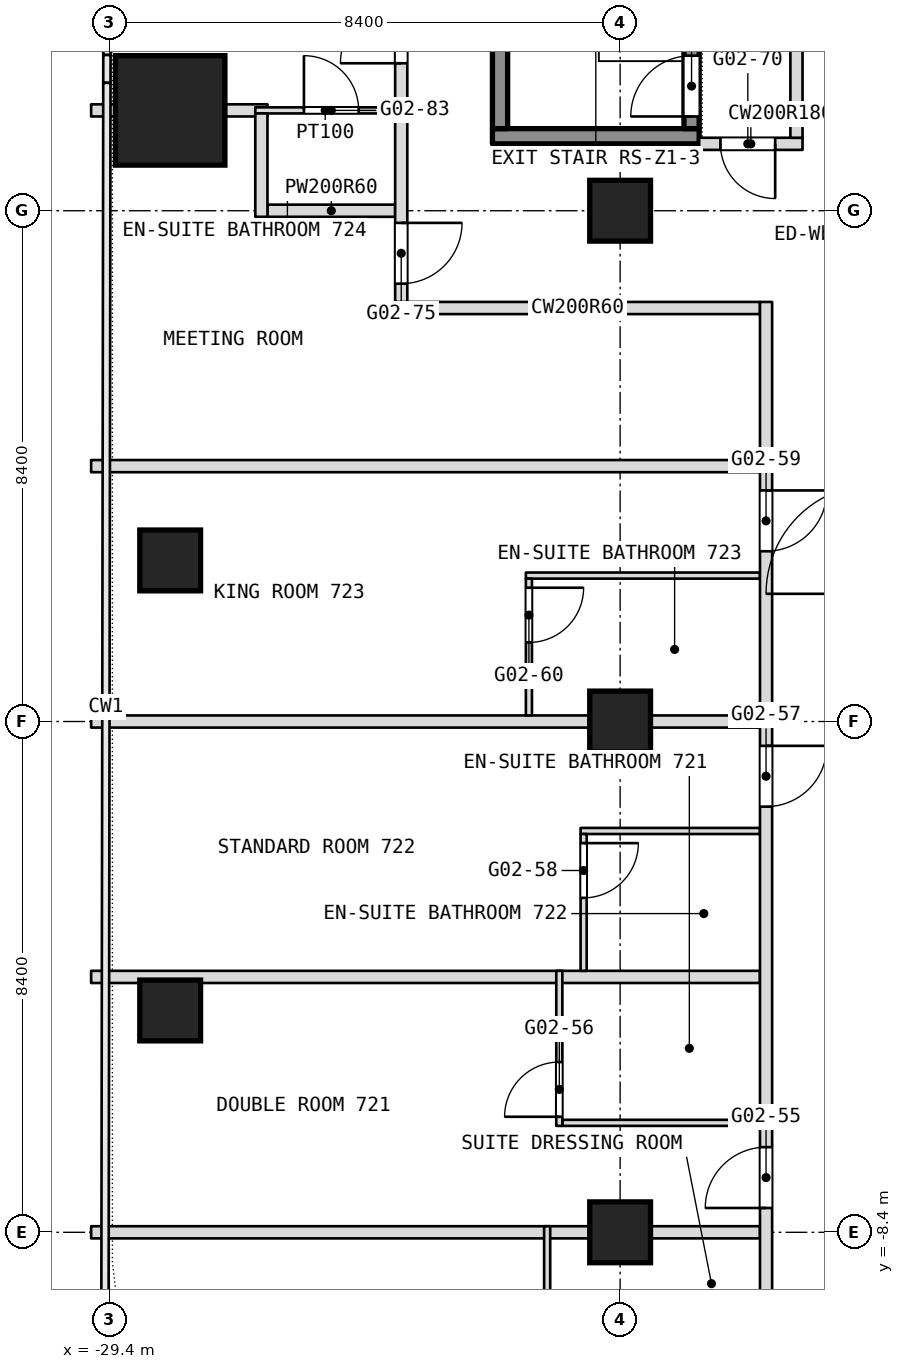
"""IFC4 building model, lengths in metres.
Left out: names, types, materials, properties, quantities, classifications, styles, units other than length and angle.
Written with IfcOpenShell. Run it as: python <this file> out.ifc"""

import sys

from ifc_helpers import new_model, si_unit, direction, frame, frame_2d, origin, origin_2d, place, context, subcontext, project, spatial, rectangle, extrude, element, fill, save


model = new_model("IFC4")
c1 = context("Model", 3, precision=1e-05, world=origin(), true_north=direction((0.0, 1.0)))
c2 = subcontext(c1, "Body", "Model", "MODEL_VIEW")
j1 = project(units=[si_unit("LENGTHUNIT", "METRE"), si_unit("PLANEANGLEUNIT", "RADIAN")], contexts=[c1])
p1 = place(None, origin())
s1 = spatial("IfcSite", under=j1, at=p1, CompositionType="ELEMENT")
p2 = place(p1, origin())
s2 = spatial("IfcBuilding", under=s1, at=p2, CompositionType="ELEMENT")
p3 = place(p2, frame((0.0, 0.0, 40.1)))
s3 = spatial("IfcBuildingStorey", under=s2, at=p3, CompositionType="ELEMENT", Elevation=40.1)
p4 = place(p3, frame((-28.4, 10.05, 0.0), z_axis=(0.0, 0.0, 1.0), x_axis=(1.0, 0.0, 0.0)))
e1 = element("IfcColumn", 1, at=p4, inside=s3, PredefinedType="COLUMN", context=c2, shape_type="SweptSolid", body=[
    extrude(rectangle(XDim=1.8, YDim=1.8, at=origin_2d()), origin(), (0.0, 0.0, 1.0), 3.6),
])
for number, where, z_axis, x_axis in (
    (2, (-21.0, -8.4, 0.0), (0.0, 0.0, 1.0), (1.0, 0.0, 0.0)),
    (3, (-21.0, 0.0, 0.0), (0.0, 0.0, 1.0), (1.0, 0.0, 0.0)),
    (4, (-21.0, 8.4, 0.0), (0.0, 0.0, 1.0), (1.0, 0.0, 0.0)),
    (5, (-28.4, -4.752, 0.0), (0.0, 0.0, 1.0), (1.0, 0.0, 0.0)),
    (6, (-28.4, 2.649, 0.0), (0.0, 0.0, 1.0), (1.0, 0.0, 0.0)),
):
    element("IfcColumn", number, at=place(p3, frame(where, z_axis=z_axis, x_axis=x_axis)), inside=s3, PredefinedType="COLUMN", context=c2, shape_type="SweptSolid", body=[
        extrude(rectangle(XDim=1.0, YDim=1.0, at=origin_2d()), origin(), (0.0, 0.0, 1.0), 3.6),
    ])
p5 = place(p3, frame((-29.7, -8.4, 0.0), z_axis=(0.0, 0.0, 1.0), x_axis=(1.0, 0.0, 0.0)))
e7 = element("IfcWall", 7, at=p5, inside=s3, PredefinedType="PARTITIONING", context=c2, shape_type="SweptSolid", body=[
    extrude(rectangle(XDim=11.0, YDim=0.2, at=frame_2d((5.5, 0.0))), origin(), (0.0, 0.0, 1.0), 2.84),
])
p6 = place(p3, frame((-21.95, -6.6, 0.0), z_axis=(0.0, 0.0, 1.0), x_axis=(1.0, 0.0, 0.0)))
e8 = element("IfcWall", 8, at=p6, inside=s3, PredefinedType="PARTITIONING", context=c2, shape_type="SweptSolid", body=[
    extrude(rectangle(XDim=3.25, YDim=0.1, at=frame_2d((1.625, 0.0))), origin(), (0.0, 0.0, 1.0), 3.34),
])
p7 = place(p3, frame((-29.7, -4.2, 0.0), z_axis=(0.0, 0.0, 1.0), x_axis=(1.0, 0.0, 0.0)))
e9 = element("IfcWall", 9, at=p7, inside=s3, PredefinedType="PARTITIONING", context=c2, shape_type="SweptSolid", body=[
    extrude(rectangle(XDim=11.0, YDim=0.2, at=frame_2d((5.5, 0.0))), origin(), (0.0, 0.0, 1.0), 3.34),
])
p8 = place(p3, frame((-21.65, -1.8, 0.0), z_axis=(0.0, 0.0, 1.0), x_axis=(1.0, 0.0, 0.0)))
e10 = element("IfcWall", 10, at=p8, inside=s3, PredefinedType="PARTITIONING", context=c2, shape_type="SweptSolid", body=[
    extrude(rectangle(XDim=2.95, YDim=0.1, at=frame_2d((1.475, 0.0))), origin(), (0.0, 0.0, 1.0), 3.34),
])
p9 = place(p3, frame((-29.7, 0.0, 0.0), z_axis=(0.0, 0.0, 1.0), x_axis=(1.0, 0.0, 0.0)))
e11 = element("IfcWall", 11, at=p9, inside=s3, PredefinedType="PARTITIONING", context=c2, shape_type="SweptSolid", body=[
    extrude(rectangle(XDim=11.0, YDim=0.2, at=frame_2d((5.5, 0.0))), origin(), (0.0, 0.0, 1.0), 2.84),
])
p10 = place(p3, frame((-22.55, 2.4, 0.0), z_axis=(0.0, 0.0, 1.0), x_axis=(1.0, 0.0, 0.0)))
e12 = element("IfcWall", 12, at=p10, inside=s3, PredefinedType="PARTITIONING", context=c2, shape_type="SweptSolid", body=[
    extrude(rectangle(XDim=3.85, YDim=0.1, at=frame_2d((1.925, 0.0))), origin(), (0.0, 0.0, 1.0), 3.34),
])
p11 = place(p3, frame((-29.7, 4.2, 0.0), z_axis=(0.0, 0.0, 1.0), x_axis=(1.0, 0.0, 0.0)))
e13 = element("IfcWall", 13, at=p11, inside=s3, PredefinedType="PARTITIONING", context=c2, shape_type="SweptSolid", body=[
    extrude(rectangle(XDim=11.0, YDim=0.2, at=frame_2d((5.5, 0.0))), origin(), (0.0, 0.0, 1.0), 3.34),
])
p12 = place(p3, frame((-24.7, 6.8, 0.0), z_axis=(0.0, 0.0, 1.0), x_axis=(1.0, 0.0, 0.0)))
e14 = element("IfcWall", 14, at=p12, inside=s3, PredefinedType="PARTITIONING", context=c2, shape_type="SweptSolid", body=[
    extrude(rectangle(XDim=6.0, YDim=0.2, at=frame_2d((3.0, 0.0))), origin(), (0.0, 0.0, 1.0), 3.34),
])
p13 = place(p3, frame((-26.8, 8.4, 0.0), z_axis=(0.0, 0.0, 1.0), x_axis=(1.0, 0.0, 0.0)))
e15 = element("IfcWall", 15, at=p13, inside=s3, PredefinedType="PARTITIONING", context=c2, shape_type="SweptSolid", body=[
    extrude(rectangle(XDim=2.1, YDim=0.2, at=frame_2d((1.05, 0.0))), origin(), (0.0, 0.0, 1.0), 2.84),
])
p14 = place(p3, frame((-19.7, 9.5, 0.0), z_axis=(0.0, 0.0, 1.0), x_axis=(1.0, 0.0, 0.0)))
e16 = element("IfcWall", 16, at=p14, inside=s3, PredefinedType="PARTITIONING", context=c2, shape_type="SweptSolid", body=[
    extrude(rectangle(XDim=1.7, YDim=0.2, at=frame_2d((0.85, 0.0))), origin(), (0.0, 0.0, 1.0), 3.34),
])
p15 = place(p14, frame((0.35, 0.0, 0.0)))
e17 = element("IfcOpeningElement", 17, at=p15, cuts=e16, PredefinedType="OPENING", context=c2, shape_type="SweptSolid", body=[
    extrude(rectangle(XDim=0.9, YDim=2.1, at=frame_2d((0.45, 1.05))), frame((0.0, 0.1, 0.0), z_axis=(0.0, -1.0, 0.0), x_axis=(1.0, 0.0, 0.0)), (0.0, 0.0, 1.0), 0.2),
])
p16 = place(p3, frame((-29.7, 10.05, 0.0), z_axis=(0.0, 0.0, 1.0), x_axis=(1.0, 0.0, 0.0)))
e18 = element("IfcWall", 18, at=p16, inside=s3, PredefinedType="PARTITIONING", context=c2, shape_type="SweptSolid", body=[
    extrude(rectangle(XDim=0.4, YDim=0.2, at=frame_2d((0.2, 0.0))), origin(), (0.0, 0.0, 1.0), 3.34),
])
p17 = place(p3, frame((-27.5, 10.05, 0.0), z_axis=(0.0, 0.0, 1.0), x_axis=(1.0, 0.0, 0.0)))
e19 = element("IfcWall", 19, at=p17, inside=s3, PredefinedType="PARTITIONING", context=c2, shape_type="SweptSolid", body=[
    extrude(rectangle(XDim=0.7, YDim=0.2, at=frame_2d((0.35, 0.0))), origin(), (0.0, 0.0, 1.0), 3.34),
])
p18 = place(p3, frame((-27.0, 10.05, 0.0), z_axis=(0.0, 0.0, 1.0), x_axis=(1.0, 0.0, 0.0)))
e20 = element("IfcWall", 20, at=p18, inside=s3, PredefinedType="PARTITIONING", context=c2, shape_type="SweptSolid", body=[
    extrude(rectangle(XDim=2.3, YDim=0.1, at=frame_2d((1.15, 0.0))), origin(), (0.0, 0.0, 1.0), 3.34),
])
p19 = place(p18, frame((0.8, 0.0, 0.0)))
e21 = element("IfcOpeningElement", 21, at=p19, cuts=e20, PredefinedType="OPENING", context=c2, shape_type="SweptSolid", body=[
    extrude(rectangle(XDim=0.9, YDim=2.1, at=frame_2d((0.45, 1.05))), frame((0.0, 0.05, 0.0), z_axis=(0.0, -1.0, 0.0), x_axis=(1.0, 0.0, 0.0)), (0.0, 0.0, 1.0), 0.1),
])
p20 = place(p3, frame((-18.1, 9.6, 0.0), z_axis=(0.0, 0.0, 1.0), x_axis=(0.0, 1.0, 0.0)))
e22 = element("IfcWall", 22, at=p20, inside=s3, PredefinedType="PARTITIONING", context=c2, shape_type="SweptSolid", body=[
    extrude(rectangle(XDim=6.2, YDim=0.2, at=frame_2d((3.1, 0.0))), origin(), (0.0, 0.0, 1.0), 3.34),
])
p21 = place(p3, frame((-18.6, -16.665, 0.0), z_axis=(0.0, 0.0, 1.0), x_axis=(0.0, 1.0, 0.0)))
e23 = element("IfcWall", 23, at=p21, inside=s3, PredefinedType="PARTITIONING", context=c2, shape_type="SweptSolid", body=[
    extrude(rectangle(XDim=23.565, YDim=0.2, at=frame_2d((11.782, 0.0))), origin(), (0.0, 0.0, 1.0), 3.34),
])
p22 = place(p21, frame((4.0, 0.0, 0.0)))
e24 = element("IfcOpeningElement", 24, at=p22, cuts=e23, PredefinedType="OPENING", context=c2, shape_type="SweptSolid", body=[
    extrude(rectangle(XDim=1.1, YDim=2.1, at=frame_2d((0.55, 1.05))), frame((0.0, 0.1, 0.0), z_axis=(0.0, -1.0, 0.0), x_axis=(1.0, 0.0, 0.0)), (0.0, 0.0, 1.0), 0.2),
])
p23 = place(p21, frame((8.665, 0.0, 0.0)))
e25 = element("IfcOpeningElement", 25, at=p23, cuts=e23, PredefinedType="OPENING", context=c2, shape_type="SweptSolid", body=[
    extrude(rectangle(XDim=1.0, YDim=2.1, at=frame_2d((0.5, 1.05))), frame((0.0, 0.1, 0.0), z_axis=(0.0, -1.0, 0.0), x_axis=(1.0, 0.0, 0.0)), (0.0, 0.0, 1.0), 0.2),
])
p24 = place(p21, frame((15.265, 0.0, 0.0)))
e26 = element("IfcOpeningElement", 26, at=p24, cuts=e23, PredefinedType="OPENING", context=c2, shape_type="SweptSolid", body=[
    extrude(rectangle(XDim=1.0, YDim=2.1, at=frame_2d((0.5, 1.05))), frame((0.0, 0.1, 0.0), z_axis=(0.0, -1.0, 0.0), x_axis=(1.0, 0.0, 0.0)), (0.0, 0.0, 1.0), 0.2),
])
p25 = place(p21, frame((19.465, 0.0, 0.0)))
e27 = element("IfcOpeningElement", 27, at=p25, cuts=e23, PredefinedType="OPENING", context=c2, shape_type="SweptSolid", body=[
    extrude(rectangle(XDim=1.0, YDim=2.1, at=frame_2d((0.5, 1.05))), frame((0.0, 0.1, 0.0), z_axis=(0.0, -1.0, 0.0), x_axis=(1.0, 0.0, 0.0)), (0.0, 0.0, 1.0), 0.2),
])
p26 = place(p3, frame((-21.6, -4.1, 0.0), z_axis=(0.0, 0.0, 1.0), x_axis=(0.0, 1.0, 0.0)))
e28 = element("IfcWall", 28, at=p26, inside=s3, PredefinedType="PARTITIONING", context=c2, shape_type="SweptSolid", body=[
    extrude(rectangle(XDim=2.25, YDim=0.1, at=frame_2d((1.125, 0.0))), origin(), (0.0, 0.0, 1.0), 3.34),
])
p27 = place(p26, frame((1.2, 0.0, 0.0)))
e29 = element("IfcOpeningElement", 29, at=p27, cuts=e28, PredefinedType="OPENING", context=c2, shape_type="SweptSolid", body=[
    extrude(rectangle(XDim=0.9, YDim=2.1, at=frame_2d((0.45, 1.05))), frame((0.0, 0.05, 0.0), z_axis=(0.0, -1.0, 0.0), x_axis=(1.0, 0.0, 0.0)), (0.0, 0.0, 1.0), 0.1),
])
p28 = place(p3, frame((-22.0, -6.65, 0.0), z_axis=(0.0, 0.0, 1.0), x_axis=(0.0, 1.0, 0.0)))
e30 = element("IfcWall", 30, at=p28, inside=s3, PredefinedType="PARTITIONING", context=c2, shape_type="SweptSolid", body=[
    extrude(rectangle(XDim=2.55, YDim=0.1, at=frame_2d((1.275, 0.0))), origin(), (0.0, 0.0, 1.0), 3.34),
])
p29 = place(p28, frame((0.15, 0.0, 0.0)))
e31 = element("IfcOpeningElement", 31, at=p29, cuts=e30, PredefinedType="OPENING", context=c2, shape_type="SweptSolid", body=[
    extrude(rectangle(XDim=0.9, YDim=2.1, at=frame_2d((0.45, 1.05))), frame((0.0, 0.05, 0.0), z_axis=(0.0, -1.0, 0.0), x_axis=(1.0, 0.0, 0.0)), (0.0, 0.0, 1.0), 0.1),
])
p30 = place(p3, frame((-22.2, -10.85, 0.0), z_axis=(0.0, 0.0, 1.0), x_axis=(0.0, 1.0, 0.0)))
e32 = element("IfcWall", 32, at=p30, inside=s3, PredefinedType="PARTITIONING", context=c2, shape_type="SweptSolid", body=[
    extrude(rectangle(XDim=2.55, YDim=0.1, at=frame_2d((1.275, 0.0))), origin(), (0.0, 0.0, 1.0), 3.34),
])
p31 = place(p3, frame((-22.5, 0.1, 0.0), z_axis=(0.0, 0.0, 1.0), x_axis=(0.0, 1.0, 0.0)))
e33 = element("IfcWall", 33, at=p31, inside=s3, PredefinedType="PARTITIONING", context=c2, shape_type="SweptSolid", body=[
    extrude(rectangle(XDim=2.25, YDim=0.1, at=frame_2d((1.125, 0.0))), origin(), (0.0, 0.0, 1.0), 3.34),
])
p32 = place(p31, frame((1.2, 0.0, 0.0)))
e34 = element("IfcOpeningElement", 34, at=p32, cuts=e33, PredefinedType="OPENING", context=c2, shape_type="SweptSolid", body=[
    extrude(rectangle(XDim=0.9, YDim=2.1, at=frame_2d((0.45, 1.05))), frame((0.0, 0.05, 0.0), z_axis=(0.0, -1.0, 0.0), x_axis=(1.0, 0.0, 0.0)), (0.0, 0.0, 1.0), 0.1),
])
p33 = place(p3, frame((-24.6, 6.9, 0.0), z_axis=(0.0, 0.0, 1.0), x_axis=(0.0, 1.0, 0.0)))
e35 = element("IfcWall", 35, at=p33, inside=s3, PredefinedType="PARTITIONING", context=c2, shape_type="SweptSolid", body=[
    extrude(rectangle(XDim=11.6, YDim=0.2, at=frame_2d((5.8, 0.0))), origin(), (0.0, 0.0, 1.0), 3.34),
])
p34 = place(p33, frame((8.5, 0.0, 0.0)))
e36 = element("IfcOpeningElement", 36, at=p34, cuts=e35, PredefinedType="OPENING", context=c2, shape_type="SweptSolid", body=[
    extrude(rectangle(XDim=1.0, YDim=2.1, at=frame_2d((0.5, 1.05))), frame((0.0, 0.1, 0.0), z_axis=(0.0, -1.0, 0.0), x_axis=(1.0, 0.0, 0.0)), (0.0, 0.0, 1.0), 0.2),
])
p35 = place(p33, frame((10.2, 0.0, 0.0)))
e37 = element("IfcOpeningElement", 37, at=p35, cuts=e35, PredefinedType="OPENING", context=c2, shape_type="SweptSolid", body=[
    extrude(rectangle(XDim=1.0, YDim=2.1, at=frame_2d((0.5, 1.05))), frame((0.0, 0.1, 0.0), z_axis=(0.0, -1.0, 0.0), x_axis=(1.0, 0.0, 0.0)), (0.0, 0.0, 1.0), 0.2),
])
p36 = place(p33, frame((0.3, 0.0, 0.0)))
e38 = element("IfcOpeningElement", 38, at=p36, cuts=e35, PredefinedType="OPENING", context=c2, shape_type="SweptSolid", body=[
    extrude(rectangle(XDim=1.0, YDim=2.1, at=frame_2d((0.5, 1.05))), frame((0.0, 0.1, 0.0), z_axis=(0.0, -1.0, 0.0), x_axis=(1.0, 0.0, 0.0)), (0.0, 0.0, 1.0), 0.2),
])
p37 = place(p33, frame((3.925, 0.0, 0.0)))
e39 = element("IfcOpeningElement", 39, at=p37, cuts=e35, PredefinedType="OPENING", context=c2, shape_type="SweptSolid", body=[
    extrude(rectangle(XDim=1.0, YDim=2.1, at=frame_2d((0.5, 1.05))), frame((0.0, 0.1, 0.0), z_axis=(0.0, -1.0, 0.0), x_axis=(1.0, 0.0, 0.0)), (0.0, 0.0, 1.0), 0.2),
])
p38 = place(p3, frame((-26.9, 8.3, 0.0), z_axis=(0.0, 0.0, 1.0), x_axis=(0.0, 1.0, 0.0)))
e40 = element("IfcWall", 40, at=p38, inside=s3, PredefinedType="PARTITIONING", context=c2, shape_type="SweptSolid", body=[
    extrude(rectangle(XDim=1.7, YDim=0.2, at=frame_2d((0.85, 0.0))), origin(), (0.0, 0.0, 1.0), 3.34),
])
p39 = place(p3, frame((-23.1, 9.625, 0.1), z_axis=(0.0, 0.0, 1.0), x_axis=(1.0, 0.0, 0.0)))
e41 = element("IfcWall", 41, at=p39, inside=s3, PredefinedType="SHEAR", context=c2, shape_type="SweptSolid", body=[
    extrude(rectangle(XDim=3.4, YDim=0.25, at=frame_2d((1.7, 0.0))), origin(), (0.0, 0.0, 1.0), 3.6),
])
p40 = place(p3, frame((-22.975, 9.75, 0.1), z_axis=(0.0, 0.0, 1.0), x_axis=(0.0, 1.0, 0.0)))
e42 = element("IfcWall", 42, at=p40, inside=s3, PredefinedType="SHEAR", context=c2, shape_type="SweptSolid", body=[
    extrude(rectangle(XDim=5.7, YDim=0.25, at=frame_2d((2.85, 0.0))), origin(), (0.0, 0.0, 1.0), 3.6),
])
p41 = place(p3, frame((-19.825, 9.75, 0.1), z_axis=(0.0, 0.0, 1.0), x_axis=(0.0, 1.0, 0.0)))
e43 = element("IfcWall", 43, at=p41, inside=s3, PredefinedType="SHEAR", context=c2, shape_type="SweptSolid", body=[
    extrude(rectangle(XDim=5.7, YDim=0.25, at=frame_2d((2.85, 0.0))), origin(), (0.0, 0.0, 1.0), 3.6),
])
p42 = place(p41, frame((0.2, 0.0, 0.0)))
e44 = element("IfcOpeningElement", 44, at=p42, cuts=e43, PredefinedType="OPENING", context=c2, shape_type="SweptSolid", body=[
    extrude(rectangle(XDim=1.0, YDim=2.1, at=frame_2d((0.5, 1.05))), frame((0.0, 0.125, 0.0), z_axis=(0.0, -1.0, 0.0), x_axis=(1.0, 0.0, 0.0)), (0.0, 0.0, 1.0), 0.25),
])
p43 = place(p15, origin())
e45 = element("IfcDoor", 45, at=p43, inside=s3, OperationType="SINGLE_SWING_RIGHT", PredefinedType="DOOR", context=c2, shape_type="SweptSolid", body=[
    extrude(rectangle(XDim=0.9, YDim=2.1, at=frame_2d((0.45, 1.05))), frame((0.0, 0.025, 0.0), z_axis=(0.0, -1.0, 0.0), x_axis=(1.0, 0.0, 0.0)), (0.0, 0.0, 1.0), 0.05),
])
fill(e17, e45)
p44 = place(p19, origin())
e46 = element("IfcDoor", 46, at=p44, inside=s3, OperationType="SINGLE_SWING_LEFT", PredefinedType="DOOR", context=c2, shape_type="SweptSolid", body=[
    extrude(rectangle(XDim=0.9, YDim=2.1, at=frame_2d((0.45, 1.05))), frame((0.0, 0.025, 0.0), z_axis=(0.0, -1.0, 0.0), x_axis=(1.0, 0.0, 0.0)), (0.0, 0.0, 1.0), 0.05),
])
fill(e21, e46)
p45 = place(p23, origin())
e47 = element("IfcDoor", 47, at=p45, inside=s3, OperationType="SINGLE_SWING_RIGHT", PredefinedType="DOOR", context=c2, shape_type="SweptSolid", body=[
    extrude(rectangle(XDim=1.0, YDim=2.1, at=frame_2d((0.5, 1.05))), frame((0.0, 0.025, 0.0), z_axis=(0.0, -1.0, 0.0), x_axis=(1.0, 0.0, 0.0)), (0.0, 0.0, 1.0), 0.05),
])
fill(e25, e47)
p46 = place(p24, origin())
e48 = element("IfcDoor", 48, at=p46, inside=s3, OperationType="SINGLE_SWING_RIGHT", PredefinedType="DOOR", context=c2, shape_type="SweptSolid", body=[
    extrude(rectangle(XDim=1.0, YDim=2.1, at=frame_2d((0.5, 1.05))), frame((0.0, 0.025, 0.0), z_axis=(0.0, -1.0, 0.0), x_axis=(1.0, 0.0, 0.0)), (0.0, 0.0, 1.0), 0.05),
])
fill(e26, e48)
p47 = place(p25, origin())
e49 = element("IfcDoor", 49, at=p47, inside=s3, OperationType="SINGLE_SWING_RIGHT", PredefinedType="DOOR", context=c2, shape_type="SweptSolid", body=[
    extrude(rectangle(XDim=1.0, YDim=2.1, at=frame_2d((0.5, 1.05))), frame((0.0, 0.025, 0.0), z_axis=(0.0, -1.0, 0.0), x_axis=(1.0, 0.0, 0.0)), (0.0, 0.0, 1.0), 0.05),
])
fill(e27, e49)
p48 = place(p27, origin())
e50 = element("IfcDoor", 50, at=p48, inside=s3, OperationType="SINGLE_SWING_LEFT", PredefinedType="DOOR", context=c2, shape_type="SweptSolid", body=[
    extrude(rectangle(XDim=0.9, YDim=2.1, at=frame_2d((0.45, 1.05))), frame((0.0, 0.025, 0.0), z_axis=(0.0, -1.0, 0.0), x_axis=(1.0, 0.0, 0.0)), (0.0, 0.0, 1.0), 0.05),
])
fill(e29, e50)
p49 = place(p29, origin())
e51 = element("IfcDoor", 51, at=p49, inside=s3, OperationType="SINGLE_SWING_RIGHT", PredefinedType="DOOR", context=c2, shape_type="SweptSolid", body=[
    extrude(rectangle(XDim=0.9, YDim=2.1, at=frame_2d((0.45, 1.05))), frame((0.0, 0.025, 0.0), z_axis=(0.0, -1.0, 0.0), x_axis=(1.0, 0.0, 0.0)), (0.0, 0.0, 1.0), 0.05),
])
fill(e31, e51)
p50 = place(p32, origin())
e52 = element("IfcDoor", 52, at=p50, inside=s3, OperationType="SINGLE_SWING_LEFT", PredefinedType="DOOR", context=c2, shape_type="SweptSolid", body=[
    extrude(rectangle(XDim=0.9, YDim=2.1, at=frame_2d((0.45, 1.05))), frame((0.0, 0.025, 0.0), z_axis=(0.0, -1.0, 0.0), x_axis=(1.0, 0.0, 0.0)), (0.0, 0.0, 1.0), 0.05),
])
fill(e34, e52)
p51 = place(p36, origin())
e53 = element("IfcDoor", 53, at=p51, inside=s3, OperationType="SINGLE_SWING_LEFT", PredefinedType="DOOR", context=c2, shape_type="SweptSolid", body=[
    extrude(rectangle(XDim=1.0, YDim=2.1, at=frame_2d((0.5, 1.05))), frame((0.0, 0.025, 0.0), z_axis=(0.0, -1.0, 0.0), x_axis=(1.0, 0.0, 0.0)), (0.0, 0.0, 1.0), 0.05),
])
fill(e38, e53)
p52 = place(p37, origin())
e54 = element("IfcDoor", 54, at=p52, inside=s3, OperationType="SINGLE_SWING_LEFT", PredefinedType="DOOR", context=c2, shape_type="SweptSolid", body=[
    extrude(rectangle(XDim=1.0, YDim=2.1, at=frame_2d((0.5, 1.05))), frame((0.0, 0.025, 0.0), z_axis=(0.0, -1.0, 0.0), x_axis=(1.0, 0.0, 0.0)), (0.0, 0.0, 1.0), 0.05),
])
fill(e39, e54)
p53 = place(p42, origin())
e55 = element("IfcDoor", 55, at=p53, inside=s3, OperationType="SINGLE_SWING_LEFT", PredefinedType="DOOR", context=c2, shape_type="SweptSolid", body=[
    extrude(rectangle(XDim=1.0, YDim=2.1, at=frame_2d((0.5, 1.05))), frame((0.0, 0.025, 0.0), z_axis=(0.0, -1.0, 0.0), x_axis=(1.0, 0.0, 0.0)), (0.0, 0.0, 1.0), 0.05),
])
fill(e44, e55)
save(model, sys.argv[1])
